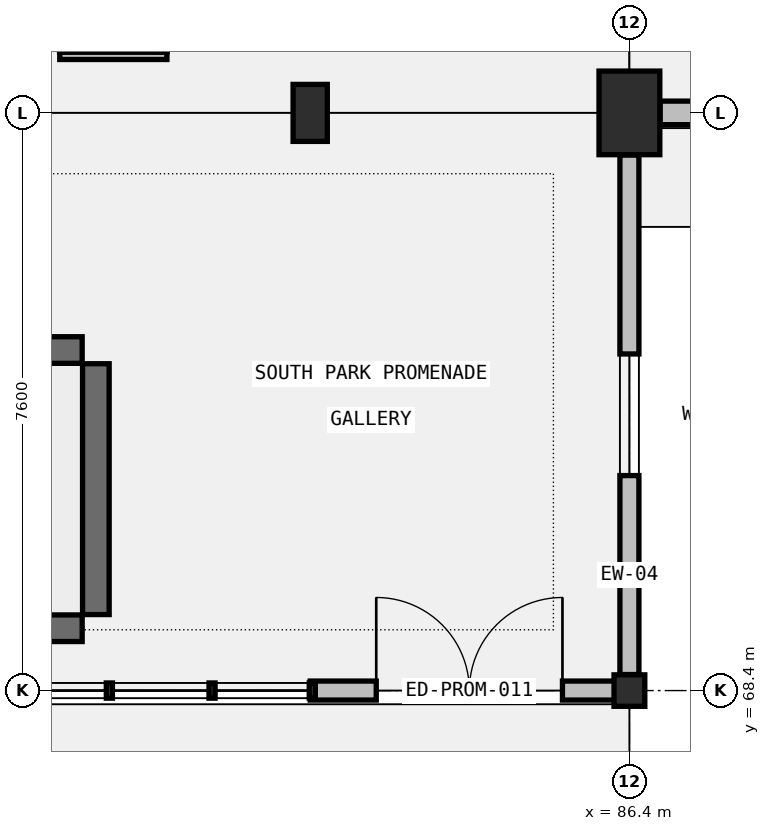
"""IFC4 building model, lengths in metres.
Left out: names, types, materials, properties, quantities, classifications, styles, units other than length and angle.
Written with IfcOpenShell. Run it as: python <this file> out.ifc"""

import sys

from ifc_helpers import new_model, si_unit, direction, frame, frame_2d, origin, origin_2d, place, context, subcontext, project, spatial, rectangle, i_section, extrude, element, fill, save


model = new_model("IFC4")
c1 = context("Model", 3, precision=1e-05, world=origin(), true_north=direction((0.0, 1.0)))
c2 = subcontext(c1, "Body", "Model", "MODEL_VIEW")
j1 = project(units=[si_unit("LENGTHUNIT", "METRE"), si_unit("PLANEANGLEUNIT", "RADIAN")], contexts=[c1])
p1 = place(None, origin())
s1 = spatial("IfcSite", under=j1, at=p1, CompositionType="ELEMENT")
p2 = place(p1, origin())
s2 = spatial("IfcBuilding", under=s1, at=p2, CompositionType="ELEMENT")
p3 = place(p2, origin())
s3 = spatial("IfcBuildingStorey", under=s2, at=p3, CompositionType="ELEMENT", Elevation=0.0)
p4 = place(p3, frame((82.2, 76.0, 0.0), z_axis=(0.0, 0.0, 1.0), x_axis=(1.0, 0.0, 0.0)))
e1 = element("IfcColumn", 1, at=p4, inside=s3, PredefinedType="PILASTER", context=c2, shape_type="SweptSolid", body=[
    extrude(rectangle(XDim=0.45, YDim=0.75, at=origin_2d()), origin(), (0.0, 0.0, 1.0), 5.4),
])
p5 = place(p3, frame((86.4, 68.4, -0.3), z_axis=(0.0, 0.0, 1.0), x_axis=(1.0, 0.0, 0.0)))
e2 = element("IfcColumn", 2, at=p5, inside=s3, PredefinedType="COLUMN", context=c2, shape_type="SweptSolid", body=[
    extrude(i_section(OverallWidth=0.405, OverallDepth=0.414, WebThickness=0.018, FlangeThickness=0.028, FilletRadius=0.022, at=origin_2d()), origin(), (0.0, 0.0, 1.0), 5.7),
])
p6 = place(p3, frame((86.4, 76.0, 0.0), z_axis=(0.0, 0.0, 1.0), x_axis=(1.0, 0.0, 0.0)))
e3 = element("IfcColumn", 3, at=p6, inside=s3, PredefinedType="COLUMN", context=c2, shape_type="SweptSolid", body=[
    extrude(rectangle(XDim=0.8, YDim=1.1, at=origin_2d()), origin(), (0.0, 0.0, 1.0), 5.4),
])
p7 = place(p3, frame((71.05, 69.22, -0.3), z_axis=(0.0, 0.0, 1.0), x_axis=(1.0, 0.0, 0.0)))
e4 = element("IfcWall", 4, at=p7, inside=s3, PredefinedType="SHEAR", context=c2, shape_type="SweptSolid", body=[
    extrude(rectangle(XDim=8.15, YDim=0.35, at=frame_2d((4.075, 0.0))), origin(), (0.0, 0.0, 1.0), 5.46),
])
p8 = place(p3, frame((79.38, 69.4, -0.3), z_axis=(0.0, 0.0, 1.0), x_axis=(0.0, 1.0, 0.0)))
e5 = element("IfcWall", 5, at=p8, inside=s3, PredefinedType="SHEAR", context=c2, shape_type="SweptSolid", body=[
    extrude(rectangle(XDim=3.3, YDim=0.35, at=frame_2d((1.65, 0.0))), origin(), (0.0, 0.0, 1.0), 5.46),
])
p9 = place(p3, frame((79.2, 72.88, -0.3), z_axis=(0.0, 0.0, 1.0), x_axis=(-1.0, 0.0, 0.0)))
e6 = element("IfcWall", 6, at=p9, inside=s3, PredefinedType="SHEAR", context=c2, shape_type="SweptSolid", body=[
    extrude(rectangle(XDim=8.15, YDim=0.35, at=frame_2d((4.075, 0.0))), origin(), (0.0, 0.0, 1.0), 5.46),
])
p10 = place(p3, frame((86.804, 76.0, 0.0), z_axis=(0.0, 0.0, 1.0), x_axis=(1.0, 0.0, 0.0)))
e7 = element("IfcWall", 7, at=p10, inside=s3, PredefinedType="STANDARD", context=c2, shape_type="SweptSolid", body=[
    extrude(rectangle(XDim=7.942, YDim=0.31, at=frame_2d((3.971, 0.0))), origin(), (0.0, 0.0, 1.0), 4.328),
])
p11 = place(p10, frame((3.411, 0.0, 0.0)))
e8 = element("IfcOpeningElement", 8, at=p11, cuts=e7, PredefinedType="OPENING", context=c2, shape_type="SweptSolid", body=[
    extrude(rectangle(XDim=1.12, YDim=2.2, at=frame_2d((0.56, 1.1))), frame((0.0, 0.165, 0.0), z_axis=(0.0, -1.0, 0.0), x_axis=(1.0, 0.0, 0.0)), (0.0, 0.0, 1.0), 0.33),
])
p12 = place(p3, frame((82.2, 68.4, 0.0), z_axis=(0.0, 0.0, 1.0), x_axis=(1.0, 0.0, 0.0)))
e9 = element("IfcWall", 9, at=p12, inside=s3, PredefinedType="STANDARD", context=c2, shape_type="SweptSolid", body=[
    extrude(rectangle(XDim=4.188, YDim=0.25, at=frame_2d((2.094, 0.0))), origin(), (0.0, 0.0, 1.0), 4.542),
])
p13 = place(p12, frame((0.869, 0.0, 0.0)))
e10 = element("IfcOpeningElement", 10, at=p13, cuts=e9, PredefinedType="OPENING", context=c2, shape_type="SweptSolid", body=[
    extrude(rectangle(XDim=2.45, YDim=2.65, at=frame_2d((1.225, 1.325))), frame((0.0, 0.135, 0.0), z_axis=(0.0, -1.0, 0.0), x_axis=(1.0, 0.0, 0.0)), (0.0, 0.0, 1.0), 0.27),
])
p14 = place(p3, frame((86.4, 68.611, 0.0), z_axis=(0.0, 0.0, 1.0), x_axis=(0.0, 1.0, 0.0)))
e11 = element("IfcWall", 11, at=p14, inside=s3, PredefinedType="STANDARD", context=c2, shape_type="SweptSolid", body=[
    extrude(rectangle(XDim=6.835, YDim=0.25, at=frame_2d((3.417, 0.0))), origin(), (0.0, 0.0, 1.0), 4.542),
])
p15 = place(p14, frame((2.617, 0.0, 0.95)))
e12 = element("IfcOpeningElement", 12, at=p15, cuts=e11, PredefinedType="OPENING", context=c2, shape_type="SweptSolid", body=[
    extrude(rectangle(XDim=1.6, YDim=1.8, at=frame_2d((0.8, 0.9))), frame((0.0, 0.135, 0.0), z_axis=(0.0, -1.0, 0.0), x_axis=(1.0, 0.0, 0.0)), (0.0, 0.0, 1.0), 0.27),
])
p16 = place(p3, frame((78.905, 76.75, 0.0), z_axis=(0.0, 0.0, 1.0), x_axis=(1.0, 0.0, 0.0)))
e13 = element("IfcWall", 13, at=p16, inside=s3, PredefinedType="PARTITIONING", context=c2, shape_type="SweptSolid", body=[
    extrude(rectangle(XDim=1.41, YDim=0.095, at=frame_2d((0.705, 0.0))), origin(), (0.0, 0.0, 1.0), 5.16),
])
p17 = place(p13, origin())
e14 = element("IfcDoor", 14, at=p17, inside=s3, OperationType="DOUBLE_DOOR_SINGLE_SWING", PredefinedType="DOOR", context=c2, shape_type="SweptSolid", body=[
    extrude(rectangle(XDim=2.45, YDim=2.65, at=frame_2d((1.225, 1.325))), frame((0.0, 0.025, 0.0), z_axis=(0.0, -1.0, 0.0), x_axis=(1.0, 0.0, 0.0)), (0.0, 0.0, 1.0), 0.05),
])
fill(e10, e14)
p18 = place(p15, origin())
e15 = element("IfcWindow", 15, at=p18, inside=s3, PartitioningType="DOUBLE_PANEL_VERTICAL", PredefinedType="WINDOW", context=c2, shape_type="SweptSolid", body=[
    extrude(rectangle(XDim=1.6, YDim=1.8, at=frame_2d((0.8, 0.9))), frame((0.0, 0.03, 0.0), z_axis=(0.0, -1.0, 0.0), x_axis=(1.0, 0.0, 0.0)), (0.0, 0.0, 1.0), 0.06),
])
fill(e12, e15)
save(model, sys.argv[1])
